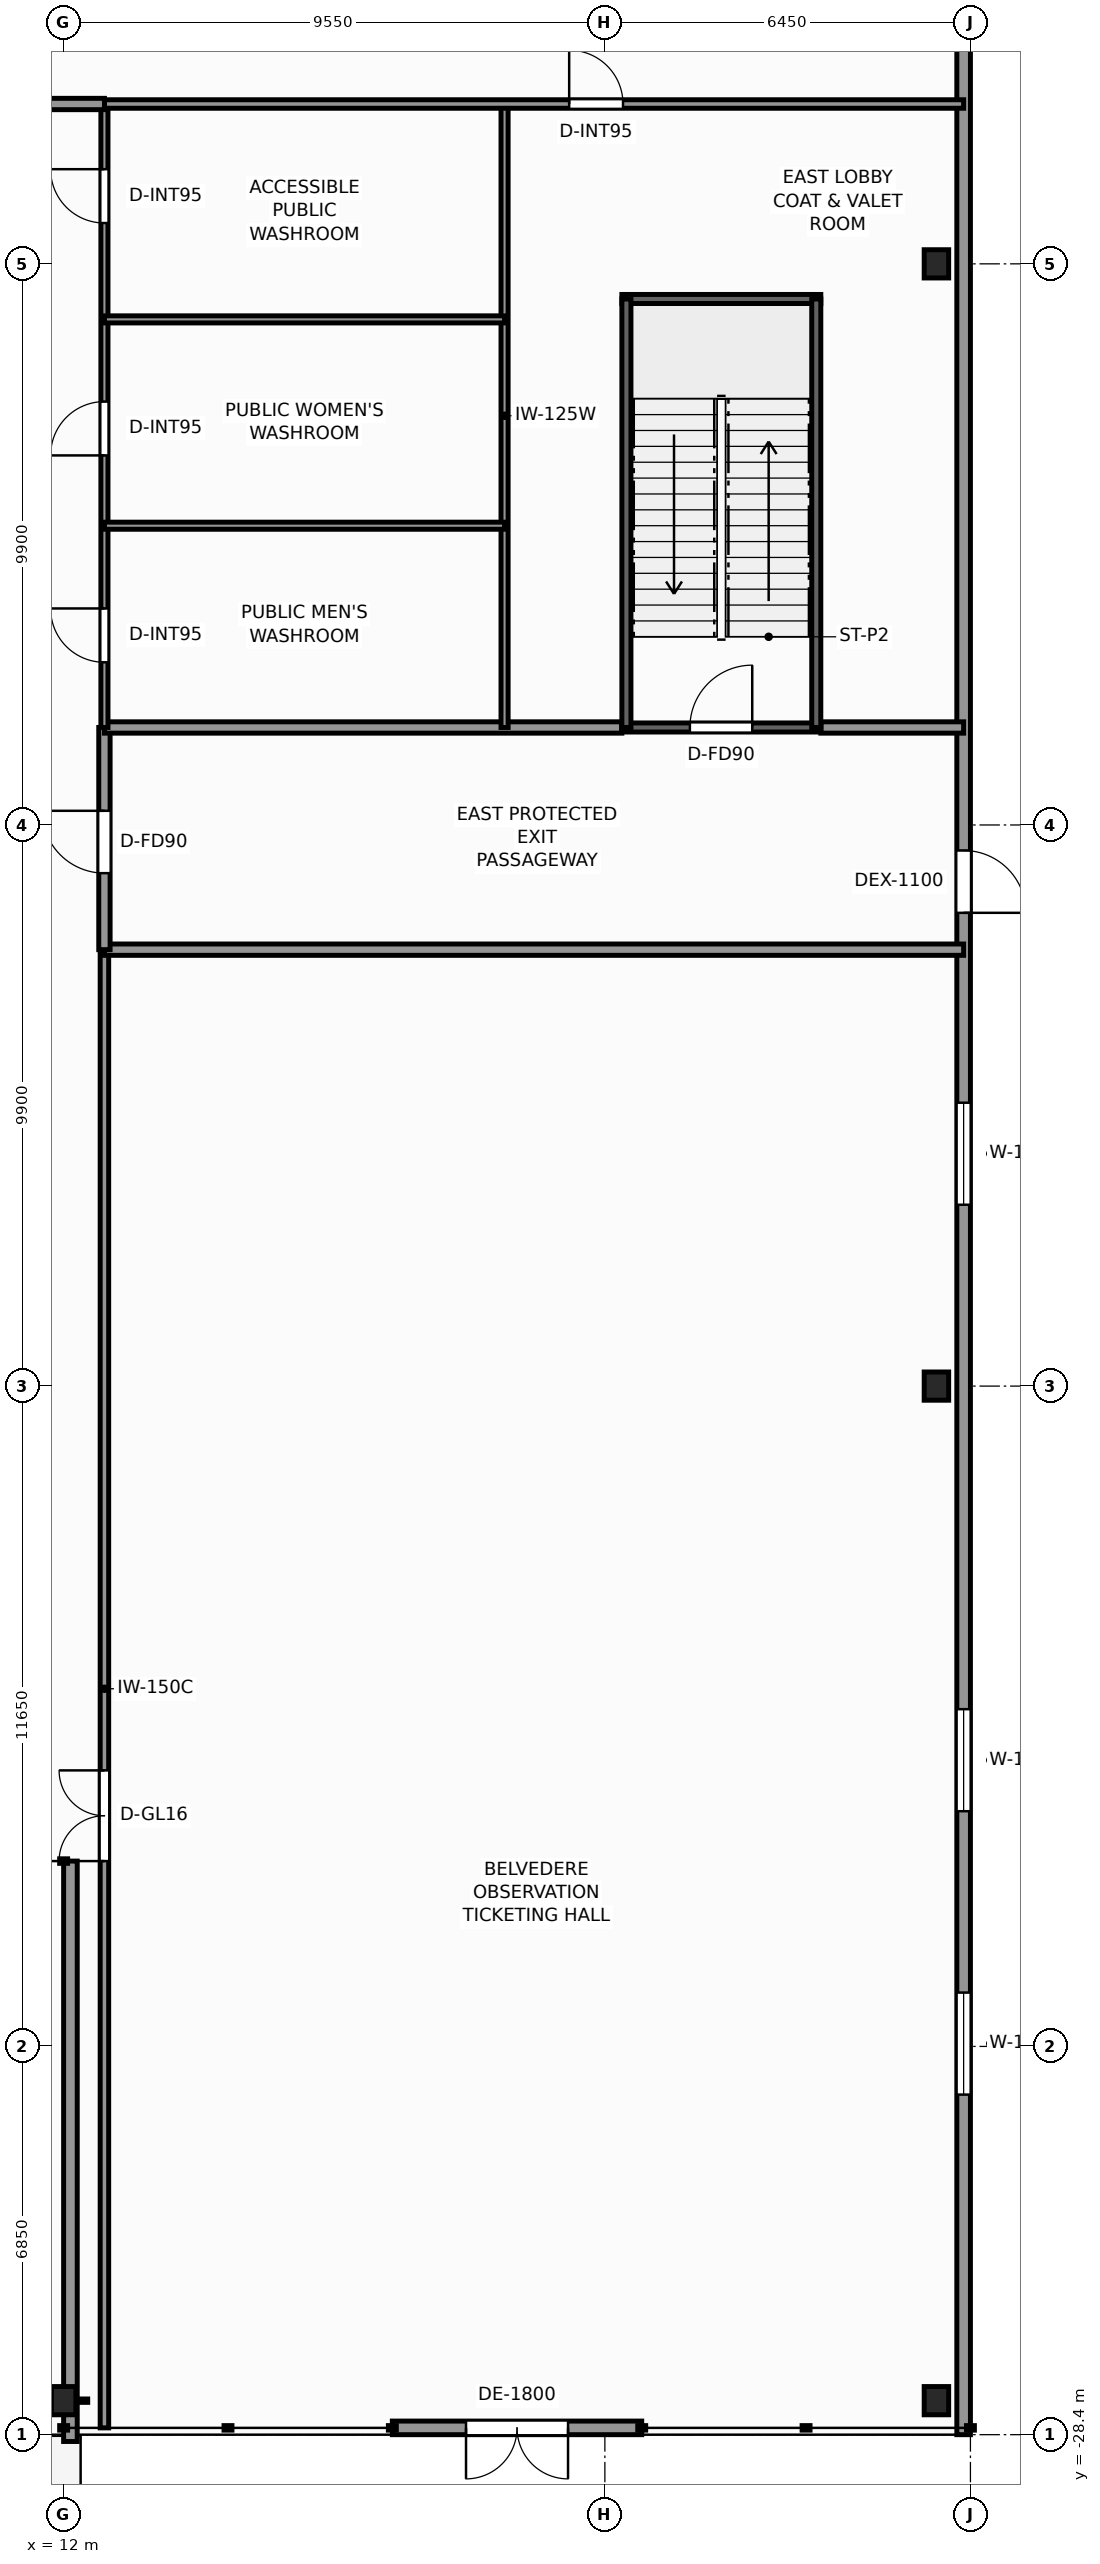
"""IFC4 building model, lengths in metres.
Left out: names, types, materials, properties, quantities, classifications, styles, units other than length and angle.
Written with IfcOpenShell. Run it as: python <this file> out.ifc"""

import sys

from ifc_helpers import new_model, si_unit, direction, frame, frame_2d, origin, origin_2d, place, context, subcontext, project, spatial, rectangle, i_section, extrude, element, fill, save


model = new_model("IFC4")
c1 = context("Model", 3, precision=1e-05, world=origin(), true_north=direction((0.0, 1.0)))
c2 = subcontext(c1, "Body", "Model", "MODEL_VIEW")
j1 = project(units=[si_unit("LENGTHUNIT", "METRE"), si_unit("PLANEANGLEUNIT", "RADIAN")], contexts=[c1])
p1 = place(None, origin())
s1 = spatial("IfcSite", under=j1, at=p1, CompositionType="ELEMENT")
p2 = place(p1, origin())
s2 = spatial("IfcBuilding", under=s1, at=p2, CompositionType="ELEMENT")
p3 = place(p2, origin())
s3 = spatial("IfcBuildingStorey", under=s2, at=p3, CompositionType="ELEMENT", Elevation=0.0)
for number, where, z_axis, x_axis in (
    (1, (12.0, -27.8, 0.0), (0.0, 0.0, 1.0), (1.0, 0.0, 0.0)),
    (2, (27.4, -27.8, 0.0), (0.0, 0.0, 1.0), (1.0, 0.0, 0.0)),
    (3, (27.4, -9.9, 0.0), (0.0, 0.0, 1.0), (1.0, 0.0, 0.0)),
    (4, (27.4, 9.9, 0.0), (0.0, 0.0, 1.0), (1.0, 0.0, 0.0)),
):
    element("IfcColumn", number, at=place(p3, frame(where, z_axis=z_axis, x_axis=x_axis)), inside=s3, PredefinedType="COLUMN", context=c2, shape_type="SweptSolid", body=[
        extrude(i_section(OverallWidth=0.432, OverallDepth=0.498, WebThickness=0.056, FlangeThickness=0.089, FilletRadius=0.025, at=origin_2d()), origin(), (0.0, 0.0, 1.0), 5.5),
    ])
p4 = place(p3, frame((12.12, -28.52, 0.0), z_axis=(0.0, 0.0, 1.0), x_axis=(0.0, 1.0, 0.0)))
e5 = element("IfcWall", 5, at=p4, inside=s3, PredefinedType="STANDARD", context=c2, shape_type="SweptSolid", body=[
    extrude(rectangle(XDim=10.24, YDim=0.24, at=frame_2d((5.12, 0.0))), origin(), (0.0, 0.0, 1.0), 4.288),
])
p5 = place(p3, frame((22.2, -28.28, 0.0), z_axis=(0.0, 0.0, 1.0), x_axis=(-1.0, 0.0, 0.0)))
e6 = element("IfcWall", 6, at=p5, inside=s3, PredefinedType="STANDARD", context=c2, shape_type="SweptSolid", body=[
    extrude(rectangle(XDim=4.4, YDim=0.24, at=frame_2d((2.2, 0.0))), origin(), (0.0, 0.0, 1.0), 5.22),
])
p6 = place(p5, frame((1.3, 0.0, 0.0)))
e7 = element("IfcOpeningElement", 7, at=p6, cuts=e6, PredefinedType="OPENING", context=c2, shape_type="SweptSolid", body=[
    extrude(rectangle(XDim=1.8, YDim=2.3, at=frame_2d((0.9, 1.15))), frame((0.0, 0.13, 0.0), z_axis=(0.0, -1.0, 0.0), x_axis=(1.0, 0.0, 0.0)), (0.0, 0.0, 1.0), 0.26),
])
p7 = place(p3, frame((27.88, 28.4, 0.0), z_axis=(0.0, 0.0, 1.0), x_axis=(0.0, -1.0, 0.0)))
e8 = element("IfcWall", 8, at=p7, inside=s3, PredefinedType="STANDARD", context=c2, shape_type="SweptSolid", body=[
    extrude(rectangle(XDim=56.8, YDim=0.24, at=frame_2d((28.4, 0.0))), origin(), (0.0, 0.0, 1.0), 4.748),
])
p8 = place(p7, frame((28.85, 0.0, 0.0)))
e9 = element("IfcOpeningElement", 9, at=p8, cuts=e8, PredefinedType="OPENING", context=c2, shape_type="SweptSolid", body=[
    extrude(rectangle(XDim=1.1, YDim=2.2, at=frame_2d((0.55, 1.1))), frame((0.0, 0.13, 0.0), z_axis=(0.0, -1.0, 0.0), x_axis=(1.0, 0.0, 0.0)), (0.0, 0.0, 1.0), 0.26),
])
p9 = place(p7, frame((8.35, 0.0, 0.0)))
e10 = element("IfcOpeningElement", 10, at=p9, cuts=e8, PredefinedType="OPENING", context=c2, shape_type="SweptSolid", body=[
    extrude(rectangle(XDim=1.1, YDim=2.2, at=frame_2d((0.55, 1.1))), frame((0.0, 0.13, 0.0), z_axis=(0.0, -1.0, 0.0), x_axis=(1.0, 0.0, 0.0)), (0.0, 0.0, 1.0), 0.26),
])
p10 = place(p7, frame((33.3, 0.0, 0.75)))
e11 = element("IfcOpeningElement", 11, at=p10, cuts=e8, PredefinedType="OPENING", context=c2, shape_type="SweptSolid", body=[
    extrude(rectangle(XDim=1.8, YDim=2.4, at=frame_2d((0.9, 1.2))), frame((0.0, 0.13, 0.0), z_axis=(0.0, -1.0, 0.0), x_axis=(1.0, 0.0, 0.0)), (0.0, 0.0, 1.0), 0.26),
])
p11 = place(p7, frame((44.0, 0.0, 0.75)))
e12 = element("IfcOpeningElement", 12, at=p11, cuts=e8, PredefinedType="OPENING", context=c2, shape_type="SweptSolid", body=[
    extrude(rectangle(XDim=1.8, YDim=2.4, at=frame_2d((0.9, 1.2))), frame((0.0, 0.13, 0.0), z_axis=(0.0, -1.0, 0.0), x_axis=(1.0, 0.0, 0.0)), (0.0, 0.0, 1.0), 0.26),
])
p12 = place(p7, frame((49.0, 0.0, 0.75)))
e13 = element("IfcOpeningElement", 13, at=p12, cuts=e8, PredefinedType="OPENING", context=c2, shape_type="SweptSolid", body=[
    extrude(rectangle(XDim=1.8, YDim=2.4, at=frame_2d((0.9, 1.2))), frame((0.0, 0.13, 0.0), z_axis=(0.0, -1.0, 0.0), x_axis=(1.0, 0.0, 0.0)), (0.0, 0.0, 1.0), 0.26),
])
p13 = place(p3, frame((12.72, -28.28, 0.0), z_axis=(0.0, 0.0, 1.0), x_axis=(0.0, 1.0, 0.0)))
e14 = element("IfcWall", 14, at=p13, inside=s3, PredefinedType="PARTITIONING", context=c2, shape_type="SweptSolid", body=[
    extrude(rectangle(XDim=26.08, YDim=0.15, at=frame_2d((13.04, 0.0))), origin(), (0.0, 0.0, 1.0), 4.278),
])
p14 = place(p13, frame((10.0, 0.0, 0.0)))
e15 = element("IfcOpeningElement", 15, at=p14, cuts=e14, PredefinedType="OPENING", context=c2, shape_type="SweptSolid", body=[
    extrude(rectangle(XDim=1.6, YDim=2.3, at=frame_2d((0.8, 1.15))), frame((0.0, 0.085, 0.0), z_axis=(0.0, -1.0, 0.0), x_axis=(1.0, 0.0, 0.0)), (0.0, 0.0, 1.0), 0.17),
])
p15 = place(p3, frame((12.72, -2.2, 0.0), z_axis=(0.0, 0.0, 1.0), x_axis=(1.0, 0.0, 0.0)))
e16 = element("IfcWall", 16, at=p15, inside=s3, PredefinedType="SOLIDWALL", context=c2, shape_type="SweptSolid", body=[
    extrude(rectangle(XDim=15.16, YDim=0.2, at=frame_2d((7.58, 0.0))), origin(), (0.0, 0.0, 1.0), 4.589),
])
p16 = place(p3, frame((12.72, -2.2, 0.0), z_axis=(0.0, 0.0, 1.0), x_axis=(0.0, 1.0, 0.0)))
e17 = element("IfcWall", 17, at=p16, inside=s3, PredefinedType="SOLIDWALL", context=c2, shape_type="SweptSolid", body=[
    extrude(rectangle(XDim=3.92, YDim=0.2, at=frame_2d((1.96, 0.0))), origin(), (0.0, 0.0, 1.0), 4.745),
])
p17 = place(p16, frame((1.35, 0.0, 0.0)))
e18 = element("IfcOpeningElement", 18, at=p17, cuts=e17, PredefinedType="OPENING", context=c2, shape_type="SweptSolid", body=[
    extrude(rectangle(XDim=1.1, YDim=2.2, at=frame_2d((0.55, 1.1))), frame((0.0, 0.11, 0.0), z_axis=(0.0, -1.0, 0.0), x_axis=(1.0, 0.0, 0.0)), (0.0, 0.0, 1.0), 0.22),
])
p18 = place(p3, frame((12.72, 1.72, 0.0), z_axis=(0.0, 0.0, 1.0), x_axis=(1.0, 0.0, 0.0)))
e19 = element("IfcWall", 19, at=p18, inside=s3, PredefinedType="SOLIDWALL", context=c2, shape_type="SweptSolid", body=[
    extrude(rectangle(XDim=9.13, YDim=0.2, at=frame_2d((4.565, 0.0))), origin(), (0.0, 0.0, 1.0), 5.22),
])
p19 = place(p3, frame((25.36, 1.72, 0.0), z_axis=(0.0, 0.0, 1.0), x_axis=(1.0, 0.0, 0.0)))
e20 = element("IfcWall", 20, at=p19, inside=s3, PredefinedType="SOLIDWALL", context=c2, shape_type="SweptSolid", body=[
    extrude(rectangle(XDim=2.52, YDim=0.2, at=frame_2d((1.26, 0.0))), origin(), (0.0, 0.0, 1.0), 4.589),
])
p20 = place(p3, frame((12.72, 1.72, 0.0), z_axis=(0.0, 0.0, 1.0), x_axis=(0.0, 1.0, 0.0)))
e21 = element("IfcWall", 21, at=p20, inside=s3, PredefinedType="PARTITIONING", context=c2, shape_type="SweptSolid", body=[
    extrude(rectangle(XDim=11.0, YDim=0.125, at=frame_2d((5.5, 0.0))), origin(), (0.0, 0.0, 1.0), 4.278),
])
p21 = place(p20, frame((1.15, 0.0, 0.0)))
e22 = element("IfcOpeningElement", 22, at=p21, cuts=e21, PredefinedType="OPENING", context=c2, shape_type="SweptSolid", body=[
    extrude(rectangle(XDim=0.95, YDim=2.06, at=frame_2d((0.475, 1.03))), frame((0.0, 0.073, 0.0), z_axis=(0.0, -1.0, 0.0), x_axis=(1.0, 0.0, 0.0)), (0.0, 0.0, 1.0), 0.145),
])
p22 = place(p20, frame((4.8, 0.0, 0.0)))
e23 = element("IfcOpeningElement", 23, at=p22, cuts=e21, PredefinedType="OPENING", context=c2, shape_type="SweptSolid", body=[
    extrude(rectangle(XDim=0.95, YDim=2.06, at=frame_2d((0.475, 1.03))), frame((0.0, 0.073, 0.0), z_axis=(0.0, -1.0, 0.0), x_axis=(1.0, 0.0, 0.0)), (0.0, 0.0, 1.0), 0.145),
])
p23 = place(p20, frame((8.9, 0.0, 0.0)))
e24 = element("IfcOpeningElement", 24, at=p23, cuts=e21, PredefinedType="OPENING", context=c2, shape_type="SweptSolid", body=[
    extrude(rectangle(XDim=0.95, YDim=2.06, at=frame_2d((0.475, 1.03))), frame((0.0, 0.073, 0.0), z_axis=(0.0, -1.0, 0.0), x_axis=(1.0, 0.0, 0.0)), (0.0, 0.0, 1.0), 0.145),
])
p24 = place(p3, frame((19.78, 1.72, 0.0), z_axis=(0.0, 0.0, 1.0), x_axis=(0.0, 1.0, 0.0)))
e25 = element("IfcWall", 25, at=p24, inside=s3, PredefinedType="PARTITIONING", context=c2, shape_type="SweptSolid", body=[
    extrude(rectangle(XDim=11.0, YDim=0.125, at=frame_2d((5.5, 0.0))), origin(), (0.0, 0.0, 1.0), 4.278),
])
for number, where, z_axis, x_axis in (
    (26, (12.72, 5.28, 0.0), (0.0, 0.0, 1.0), (1.0, 0.0, 0.0)),
    (27, (12.72, 8.92, 0.0), (0.0, 0.0, 1.0), (1.0, 0.0, 0.0)),
):
    element("IfcWall", number, at=place(p3, frame(where, z_axis=z_axis, x_axis=x_axis)), inside=s3, PredefinedType="PARTITIONING", context=c2, shape_type="SweptSolid", body=[
        extrude(rectangle(XDim=7.06, YDim=0.125, at=frame_2d((3.53, 0.0))), origin(), (0.0, 0.0, 1.0), 5.22),
    ])
p25 = place(p3, frame((12.72, 12.72, 0.0), z_axis=(0.0, 0.0, 1.0), x_axis=(1.0, 0.0, 0.0)))
e28 = element("IfcWall", 28, at=p25, inside=s3, PredefinedType="PARTITIONING", context=c2, shape_type="SweptSolid", body=[
    extrude(rectangle(XDim=15.16, YDim=0.15, at=frame_2d((7.58, 0.0))), origin(), (0.0, 0.0, 1.0), 4.589),
])
p26 = place(p25, frame((8.2, 0.0, 0.0)))
e29 = element("IfcOpeningElement", 29, at=p26, cuts=e28, PredefinedType="OPENING", context=c2, shape_type="SweptSolid", body=[
    extrude(rectangle(XDim=0.95, YDim=2.06, at=frame_2d((0.475, 1.03))), frame((0.0, 0.085, 0.0), z_axis=(0.0, -1.0, 0.0), x_axis=(1.0, 0.0, 0.0)), (0.0, 0.0, 1.0), 0.17),
])
p27 = place(p3, frame((-12.72, 12.72, 0.0), z_axis=(0.0, 0.0, 1.0), x_axis=(1.0, 0.0, 0.0)))
e30 = element("IfcWall", 30, at=p27, inside=s3, PredefinedType="SOLIDWALL", context=c2, shape_type="SweptSolid", body=[
    extrude(rectangle(XDim=25.44, YDim=0.2, at=frame_2d((12.72, 0.0))), origin(), (0.0, 0.0, 1.0), 4.278),
])
p28 = place(p27, frame((18.5, 0.0, 0.0)))
e31 = element("IfcOpeningElement", 31, at=p28, cuts=e30, PredefinedType="OPENING", context=c2, shape_type="SweptSolid", body=[
    extrude(rectangle(XDim=1.1, YDim=2.2, at=frame_2d((0.55, 1.1))), frame((0.0, 0.11, 0.0), z_axis=(0.0, -1.0, 0.0), x_axis=(1.0, 0.0, 0.0)), (0.0, 0.0, 1.0), 0.22),
])
p29 = place(p3, frame((21.85, 1.72, 0.0), z_axis=(0.0, 0.0, 1.0), x_axis=(1.0, 0.0, 0.0)))
e32 = element("IfcWall", 32, at=p29, inside=s3, PredefinedType="SHEAR", context=c2, shape_type="SweptSolid", body=[
    extrude(rectangle(XDim=3.51, YDim=0.16, at=frame_2d((1.755, 0.0))), origin(), (0.0, 0.0, 1.0), 5.5),
])
p30 = place(p29, frame((1.2, 0.0, 0.0)))
e33 = element("IfcOpeningElement", 33, at=p30, cuts=e32, PredefinedType="OPENING", context=c2, shape_type="SweptSolid", body=[
    extrude(rectangle(XDim=1.1, YDim=2.2, at=frame_2d((0.55, 1.1))), frame((0.0, 0.09, 0.0), z_axis=(0.0, -1.0, 0.0), x_axis=(1.0, 0.0, 0.0)), (0.0, 0.0, 1.0), 0.18),
])
p31 = place(p3, frame((21.85, 9.28, 0.0), z_axis=(0.0, 0.0, 1.0), x_axis=(1.0, 0.0, 0.0)))
e34 = element("IfcWall", 34, at=p31, inside=s3, PredefinedType="SHEAR", context=c2, shape_type="SweptSolid", body=[
    extrude(rectangle(XDim=3.51, YDim=0.16, at=frame_2d((1.755, 0.0))), origin(), (0.0, 0.0, 1.0), 5.5),
])
for number, where, z_axis, x_axis in (
    (35, (21.93, 1.72, 0.0), (0.0, 0.0, 1.0), (0.0, 1.0, 0.0)),
    (36, (25.28, 1.72, 0.0), (0.0, 0.0, 1.0), (0.0, 1.0, 0.0)),
):
    element("IfcWall", number, at=place(p3, frame(where, z_axis=z_axis, x_axis=x_axis)), inside=s3, PredefinedType="SHEAR", context=c2, shape_type="SweptSolid", body=[
        extrude(rectangle(XDim=7.56, YDim=0.16, at=frame_2d((3.78, 0.0))), origin(), (0.0, 0.0, 1.0), 5.5),
    ])
p32 = place(p6, origin())
e37 = element("IfcDoor", 37, at=p32, inside=s3, OperationType="DOUBLE_DOOR_SINGLE_SWING", PredefinedType="DOOR", context=c2, shape_type="SweptSolid", body=[
    extrude(rectangle(XDim=1.8, YDim=2.3, at=frame_2d((0.9, 1.15))), frame((0.0, 0.025, 0.0), z_axis=(0.0, -1.0, 0.0), x_axis=(1.0, 0.0, 0.0)), (0.0, 0.0, 1.0), 0.05),
])
fill(e7, e37)
p33 = place(p8, origin())
e38 = element("IfcDoor", 38, at=p33, inside=s3, OperationType="SINGLE_SWING_RIGHT", PredefinedType="DOOR", context=c2, shape_type="SweptSolid", body=[
    extrude(rectangle(XDim=1.1, YDim=2.2, at=frame_2d((0.55, 1.1))), frame((0.0, 0.025, 0.0), z_axis=(0.0, -1.0, 0.0), x_axis=(1.0, 0.0, 0.0)), (0.0, 0.0, 1.0), 0.05),
])
fill(e9, e38)
p34 = place(p10, origin())
e39 = element("IfcWindow", 39, at=p34, inside=s3, PartitioningType="SINGLE_PANEL", PredefinedType="WINDOW", context=c2, shape_type="SweptSolid", body=[
    extrude(rectangle(XDim=1.8, YDim=2.4, at=frame_2d((0.9, 1.2))), frame((0.0, 0.03, 0.0), z_axis=(0.0, -1.0, 0.0), x_axis=(1.0, 0.0, 0.0)), (0.0, 0.0, 1.0), 0.06),
])
fill(e11, e39)
p35 = place(p11, origin())
e40 = element("IfcWindow", 40, at=p35, inside=s3, PartitioningType="SINGLE_PANEL", PredefinedType="WINDOW", context=c2, shape_type="SweptSolid", body=[
    extrude(rectangle(XDim=1.8, YDim=2.4, at=frame_2d((0.9, 1.2))), frame((0.0, 0.03, 0.0), z_axis=(0.0, -1.0, 0.0), x_axis=(1.0, 0.0, 0.0)), (0.0, 0.0, 1.0), 0.06),
])
fill(e12, e40)
p36 = place(p12, origin())
e41 = element("IfcWindow", 41, at=p36, inside=s3, PartitioningType="SINGLE_PANEL", PredefinedType="WINDOW", context=c2, shape_type="SweptSolid", body=[
    extrude(rectangle(XDim=1.8, YDim=2.4, at=frame_2d((0.9, 1.2))), frame((0.0, 0.03, 0.0), z_axis=(0.0, -1.0, 0.0), x_axis=(1.0, 0.0, 0.0)), (0.0, 0.0, 1.0), 0.06),
])
fill(e13, e41)
p37 = place(p17, origin())
e42 = element("IfcDoor", 42, at=p37, inside=s3, OperationType="SINGLE_SWING_RIGHT", PredefinedType="DOOR", context=c2, shape_type="SweptSolid", body=[
    extrude(rectangle(XDim=1.1, YDim=2.2, at=frame_2d((0.55, 1.1))), frame((0.0, 0.025, 0.0), z_axis=(0.0, -1.0, 0.0), x_axis=(1.0, 0.0, 0.0)), (0.0, 0.0, 1.0), 0.05),
])
fill(e18, e42)
p38 = place(p14, origin())
e43 = element("IfcDoor", 43, at=p38, inside=s3, OperationType="DOUBLE_DOOR_SINGLE_SWING", PredefinedType="DOOR", context=c2, shape_type="SweptSolid", body=[
    extrude(rectangle(XDim=1.6, YDim=2.3, at=frame_2d((0.8, 1.15))), frame((0.0, 0.025, 0.0), z_axis=(0.0, -1.0, 0.0), x_axis=(1.0, 0.0, 0.0)), (0.0, 0.0, 1.0), 0.05),
])
fill(e15, e43)
p39 = place(p21, origin())
e44 = element("IfcDoor", 44, at=p39, inside=s3, OperationType="SINGLE_SWING_RIGHT", PredefinedType="DOOR", context=c2, shape_type="SweptSolid", body=[
    extrude(rectangle(XDim=0.95, YDim=2.06, at=frame_2d((0.475, 1.03))), frame((0.0, 0.025, 0.0), z_axis=(0.0, -1.0, 0.0), x_axis=(1.0, 0.0, 0.0)), (0.0, 0.0, 1.0), 0.05),
])
fill(e22, e44)
p40 = place(p22, origin())
e45 = element("IfcDoor", 45, at=p40, inside=s3, OperationType="SINGLE_SWING_LEFT", PredefinedType="DOOR", context=c2, shape_type="SweptSolid", body=[
    extrude(rectangle(XDim=0.95, YDim=2.06, at=frame_2d((0.475, 1.03))), frame((0.0, 0.025, 0.0), z_axis=(0.0, -1.0, 0.0), x_axis=(1.0, 0.0, 0.0)), (0.0, 0.0, 1.0), 0.05),
])
fill(e23, e45)
p41 = place(p23, origin())
e46 = element("IfcDoor", 46, at=p41, inside=s3, OperationType="SINGLE_SWING_RIGHT", PredefinedType="DOOR", context=c2, shape_type="SweptSolid", body=[
    extrude(rectangle(XDim=0.95, YDim=2.06, at=frame_2d((0.475, 1.03))), frame((0.0, 0.025, 0.0), z_axis=(0.0, -1.0, 0.0), x_axis=(1.0, 0.0, 0.0)), (0.0, 0.0, 1.0), 0.05),
])
fill(e24, e46)
p42 = place(p26, origin())
e47 = element("IfcDoor", 47, at=p42, inside=s3, OperationType="SINGLE_SWING_LEFT", PredefinedType="DOOR", context=c2, shape_type="SweptSolid", body=[
    extrude(rectangle(XDim=0.95, YDim=2.06, at=frame_2d((0.475, 1.03))), frame((0.0, 0.025, 0.0), z_axis=(0.0, -1.0, 0.0), x_axis=(1.0, 0.0, 0.0)), (0.0, 0.0, 1.0), 0.05),
])
fill(e29, e47)
p43 = place(p30, origin())
e48 = element("IfcDoor", 48, at=p43, inside=s3, OperationType="SINGLE_SWING_RIGHT", PredefinedType="DOOR", context=c2, shape_type="SweptSolid", body=[
    extrude(rectangle(XDim=1.1, YDim=2.2, at=frame_2d((0.55, 1.1))), frame((0.0, 0.025, 0.0), z_axis=(0.0, -1.0, 0.0), x_axis=(1.0, 0.0, 0.0)), (0.0, 0.0, 1.0), 0.05),
])
fill(e33, e48)
save(model, sys.argv[1])
